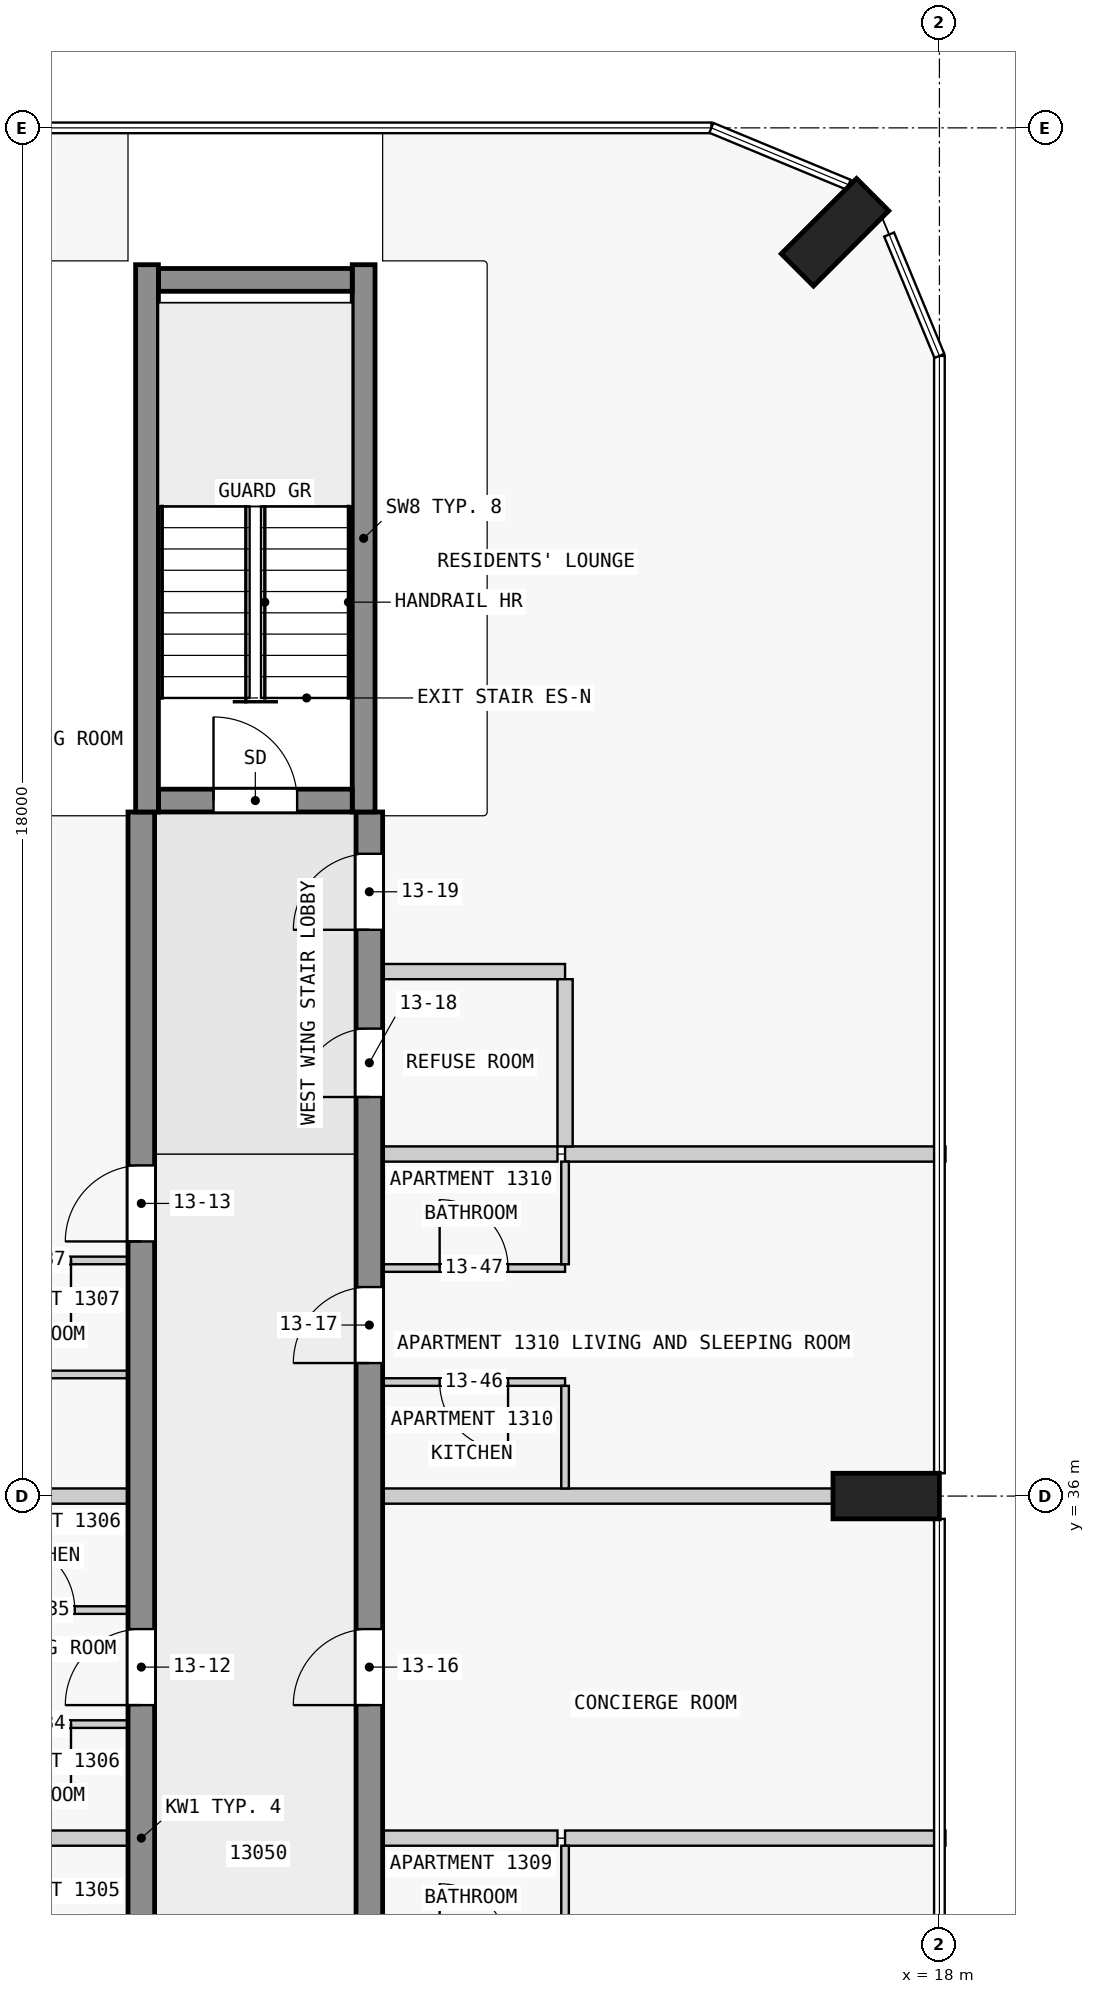
"""IFC4 building model, lengths in metres.
Left out: names, types, materials, properties, quantities, classifications, styles, units other than length and angle.
Written with IfcOpenShell. Run it as: python <this file> out.ifc"""

import sys

from ifc_helpers import new_model, si_unit, direction, frame, frame_2d, origin, origin_2d, place, context, subcontext, project, spatial, rectangle, extrude, element, fill, save


model = new_model("IFC4")
c1 = context("Model", 3, precision=1e-05, world=origin(), true_north=direction((0.0, 1.0)))
c2 = subcontext(c1, "Body", "Model", "MODEL_VIEW")
j1 = project(units=[si_unit("LENGTHUNIT", "METRE"), si_unit("PLANEANGLEUNIT", "RADIAN")], contexts=[c1])
p1 = place(None, origin())
s1 = spatial("IfcSite", under=j1, at=p1, CompositionType="ELEMENT")
p2 = place(p1, origin())
s2 = spatial("IfcBuilding", under=s1, at=p2, CompositionType="ELEMENT")
p3 = place(p2, frame((0.0, 0.0, 54.8)))
s3 = spatial("IfcBuildingStorey", under=s2, at=p3, CompositionType="ELEMENT", Elevation=54.8)
for number, where, z_axis, x_axis in (
    (1, (17.3, 36.0, 0.0), (0.0, 0.0, 1.0), (0.0, 1.0, 0.0)),
    (2, (16.626, 52.626, 0.0), (0.0, 0.0, 1.0), (-0.707, 0.707, 0.0)),
):
    element("IfcColumn", number, at=place(p3, frame(where, z_axis=z_axis, x_axis=x_axis)), inside=s3, PredefinedType="COLUMN", context=c2, shape_type="SweptSolid", body=[
        extrude(rectangle(XDim=0.6, YDim=1.4, at=origin_2d()), origin(), (0.0, 0.0, 1.0), 3.5),
    ])
p4 = place(p3, frame((7.725, 45.15, 0.0), z_axis=(0.0, 0.0, 1.0), x_axis=(1.0, 0.0, 0.0)))
e3 = element("IfcWall", 3, at=p4, inside=s3, PredefinedType="SHEAR", context=c2, shape_type="SweptSolid", body=[
    extrude(rectangle(XDim=2.55, YDim=0.3, at=frame_2d((1.275, 0.0))), origin(), (0.0, 0.0, 1.0), 3.5),
])
p5 = place(p4, frame((0.725, 0.0, 0.0)))
e4 = element("IfcOpeningElement", 4, at=p5, cuts=e3, PredefinedType="OPENING", context=c2, shape_type="SweptSolid", body=[
    extrude(rectangle(XDim=1.1, YDim=2.1, at=frame_2d((0.55, 1.05))), frame((0.0, 0.16, 0.0), z_axis=(0.0, -1.0, 0.0), x_axis=(1.0, 0.0, 0.0)), (0.0, 0.0, 1.0), 0.32),
])
p6 = place(p3, frame((7.725, 52.0, 0.0), z_axis=(0.0, 0.0, 1.0), x_axis=(1.0, 0.0, 0.0)))
e5 = element("IfcWall", 5, at=p6, inside=s3, PredefinedType="SHEAR", context=c2, shape_type="SweptSolid", body=[
    extrude(rectangle(XDim=2.55, YDim=0.3, at=frame_2d((1.275, 0.0))), origin(), (0.0, 0.0, 1.0), 3.5),
])
for number, where, z_axis, x_axis in (
    (6, (7.575, 45.0, 0.0), (0.0, 0.0, 1.0), (0.0, 1.0, 0.0)),
    (7, (10.425, 45.0, 0.0), (0.0, 0.0, 1.0), (0.0, 1.0, 0.0)),
):
    element("IfcWall", number, at=place(p3, frame(where, z_axis=z_axis, x_axis=x_axis)), inside=s3, PredefinedType="SHEAR", context=c2, shape_type="SweptSolid", body=[
        extrude(rectangle(XDim=7.2, YDim=0.3, at=frame_2d((3.6, 0.0))), origin(), (0.0, 0.0, 1.0), 3.5),
    ])
p7 = place(p3, frame((7.5, 18.0, 0.0), z_axis=(0.0, 0.0, 1.0), x_axis=(0.0, 1.0, 0.0)))
e8 = element("IfcWall", 8, at=p7, inside=s3, PredefinedType="SHEAR", context=c2, shape_type="SweptSolid", body=[
    extrude(rectangle(XDim=27.0, YDim=0.35, at=frame_2d((13.5, 0.0))), origin(), (0.0, 0.0, 1.0), 3.25),
])
p8 = place(p7, frame((1.75, 0.0, 0.0)))
e9 = element("IfcOpeningElement", 9, at=p8, cuts=e8, PredefinedType="OPENING", context=c2, shape_type="SweptSolid", body=[
    extrude(rectangle(XDim=1.0, YDim=2.1, at=frame_2d((0.5, 1.05))), frame((0.0, 0.185, 0.0), z_axis=(0.0, -1.0, 0.0), x_axis=(1.0, 0.0, 0.0)), (0.0, 0.0, 1.0), 0.37),
])
p9 = place(p7, frame((8.55, 0.0, 0.0)))
e10 = element("IfcOpeningElement", 10, at=p9, cuts=e8, PredefinedType="OPENING", context=c2, shape_type="SweptSolid", body=[
    extrude(rectangle(XDim=1.0, YDim=2.1, at=frame_2d((0.5, 1.05))), frame((0.0, 0.185, 0.0), z_axis=(0.0, -1.0, 0.0), x_axis=(1.0, 0.0, 0.0)), (0.0, 0.0, 1.0), 0.37),
])
p10 = place(p7, frame((15.25, 0.0, 0.0)))
e11 = element("IfcOpeningElement", 11, at=p10, cuts=e8, PredefinedType="OPENING", context=c2, shape_type="SweptSolid", body=[
    extrude(rectangle(XDim=1.0, YDim=2.1, at=frame_2d((0.5, 1.05))), frame((0.0, 0.185, 0.0), z_axis=(0.0, -1.0, 0.0), x_axis=(1.0, 0.0, 0.0)), (0.0, 0.0, 1.0), 0.37),
])
p11 = place(p7, frame((21.35, 0.0, 0.0)))
e12 = element("IfcOpeningElement", 12, at=p11, cuts=e8, PredefinedType="OPENING", context=c2, shape_type="SweptSolid", body=[
    extrude(rectangle(XDim=1.0, YDim=2.1, at=frame_2d((0.5, 1.05))), frame((0.0, 0.185, 0.0), z_axis=(0.0, -1.0, 0.0), x_axis=(1.0, 0.0, 0.0)), (0.0, 0.0, 1.0), 0.37),
])
p12 = place(p3, frame((10.5, 18.0, 0.0), z_axis=(0.0, 0.0, 1.0), x_axis=(0.0, 1.0, 0.0)))
e13 = element("IfcWall", 13, at=p12, inside=s3, PredefinedType="SHEAR", context=c2, shape_type="SweptSolid", body=[
    extrude(rectangle(XDim=27.0, YDim=0.35, at=frame_2d((13.5, 0.0))), origin(), (0.0, 0.0, 1.0), 3.25),
])
p13 = place(p12, frame((4.05, 0.0, 0.0)))
e14 = element("IfcOpeningElement", 14, at=p13, cuts=e13, PredefinedType="OPENING", context=c2, shape_type="SweptSolid", body=[
    extrude(rectangle(XDim=1.0, YDim=2.1, at=frame_2d((0.5, 1.05))), frame((0.0, 0.185, 0.0), z_axis=(0.0, -1.0, 0.0), x_axis=(1.0, 0.0, 0.0)), (0.0, 0.0, 1.0), 0.37),
])
p14 = place(p12, frame((10.75, 0.0, 0.0)))
e15 = element("IfcOpeningElement", 15, at=p14, cuts=e13, PredefinedType="OPENING", context=c2, shape_type="SweptSolid", body=[
    extrude(rectangle(XDim=1.0, YDim=2.1, at=frame_2d((0.5, 1.05))), frame((0.0, 0.185, 0.0), z_axis=(0.0, -1.0, 0.0), x_axis=(1.0, 0.0, 0.0)), (0.0, 0.0, 1.0), 0.37),
])
p15 = place(p12, frame((15.25, 0.0, 0.0)))
e16 = element("IfcOpeningElement", 16, at=p15, cuts=e13, PredefinedType="OPENING", context=c2, shape_type="SweptSolid", body=[
    extrude(rectangle(XDim=1.0, YDim=2.1, at=frame_2d((0.5, 1.05))), frame((0.0, 0.185, 0.0), z_axis=(0.0, -1.0, 0.0), x_axis=(1.0, 0.0, 0.0)), (0.0, 0.0, 1.0), 0.37),
])
p16 = place(p12, frame((19.75, 0.0, 0.0)))
e17 = element("IfcOpeningElement", 17, at=p16, cuts=e13, PredefinedType="OPENING", context=c2, shape_type="SweptSolid", body=[
    extrude(rectangle(XDim=1.0, YDim=2.1, at=frame_2d((0.5, 1.05))), frame((0.0, 0.185, 0.0), z_axis=(0.0, -1.0, 0.0), x_axis=(1.0, 0.0, 0.0)), (0.0, 0.0, 1.0), 0.37),
])
p17 = place(p12, frame((23.25, 0.0, 0.0)))
e18 = element("IfcOpeningElement", 18, at=p17, cuts=e13, PredefinedType="OPENING", context=c2, shape_type="SweptSolid", body=[
    extrude(rectangle(XDim=0.9, YDim=2.1, at=frame_2d((0.45, 1.05))), frame((0.0, 0.185, 0.0), z_axis=(0.0, -1.0, 0.0), x_axis=(1.0, 0.0, 0.0)), (0.0, 0.0, 1.0), 0.37),
])
p18 = place(p12, frame((25.45, 0.0, 0.0)))
e19 = element("IfcOpeningElement", 19, at=p18, cuts=e13, PredefinedType="OPENING", context=c2, shape_type="SweptSolid", body=[
    extrude(rectangle(XDim=1.0, YDim=2.1, at=frame_2d((0.5, 1.05))), frame((0.0, 0.185, 0.0), z_axis=(0.0, -1.0, 0.0), x_axis=(1.0, 0.0, 0.0)), (0.0, 0.0, 1.0), 0.37),
])
p19 = place(p3, frame((7.325, 31.5, 0.0), z_axis=(0.0, 0.0, 1.0), x_axis=(-1.0, 0.0, 0.0)))
e20 = element("IfcWall", 20, at=p19, inside=s3, PredefinedType="PARTITIONING", context=c2, shape_type="SweptSolid", body=[
    extrude(rectangle(XDim=7.175, YDim=0.2, at=frame_2d((3.587, 0.0))), origin(), (0.0, 0.0, 1.0), 3.25),
])
p20 = place(p3, frame((12.975, 31.5, 0.0), z_axis=(0.0, 0.0, 1.0), x_axis=(-1.0, 0.0, 0.0)))
e21 = element("IfcWall", 21, at=p20, inside=s3, PredefinedType="PARTITIONING", context=c2, shape_type="SweptSolid", body=[
    extrude(rectangle(XDim=2.3, YDim=0.2, at=frame_2d((1.15, 0.0))), origin(), (0.0, 0.0, 1.0), 3.25),
])
p21 = place(p3, frame((13.075, 31.5, 0.0), z_axis=(0.0, 0.0, 1.0), x_axis=(1.0, 0.0, 0.0)))
e22 = element("IfcWall", 22, at=p21, inside=s3, PredefinedType="PARTITIONING", context=c2, shape_type="SweptSolid", body=[
    extrude(rectangle(XDim=5.005, YDim=0.2, at=frame_2d((2.502, 0.0))), origin(), (0.0, 0.0, 1.0), 3.25),
])
p22 = place(p3, frame((7.325, 33.0, 0.0), z_axis=(0.0, 0.0, 1.0), x_axis=(-1.0, 0.0, 0.0)))
e23 = element("IfcWall", 23, at=p22, inside=s3, PredefinedType="PARTITIONING", context=c2, shape_type="SweptSolid", body=[
    extrude(rectangle(XDim=2.35, YDim=0.1, at=frame_2d((1.175, 0.0))), origin(), (0.0, 0.0, 1.0), 3.25),
])
p23 = place(p22, frame((0.75, 0.0, 0.0)))
e24 = element("IfcOpeningElement", 24, at=p23, cuts=e23, PredefinedType="OPENING", context=c2, shape_type="SweptSolid", body=[
    extrude(rectangle(XDim=0.9, YDim=2.1, at=frame_2d((0.45, 1.05))), frame((0.0, 0.06, 0.0), z_axis=(0.0, -1.0, 0.0), x_axis=(1.0, 0.0, 0.0)), (0.0, 0.0, 1.0), 0.12),
])
p24 = place(p3, frame((4.975, 34.5, 0.0), z_axis=(0.0, 0.0, 1.0), x_axis=(1.0, 0.0, 0.0)))
e25 = element("IfcWall", 25, at=p24, inside=s3, PredefinedType="PARTITIONING", context=c2, shape_type="SweptSolid", body=[
    extrude(rectangle(XDim=2.35, YDim=0.1, at=frame_2d((1.175, 0.0))), origin(), (0.0, 0.0, 1.0), 3.25),
])
p25 = place(p24, frame((0.75, 0.0, 0.0)))
e26 = element("IfcOpeningElement", 26, at=p25, cuts=e25, PredefinedType="OPENING", context=c2, shape_type="SweptSolid", body=[
    extrude(rectangle(XDim=0.9, YDim=2.1, at=frame_2d((0.45, 1.05))), frame((0.0, 0.06, 0.0), z_axis=(0.0, -1.0, 0.0), x_axis=(1.0, 0.0, 0.0)), (0.0, 0.0, 1.0), 0.12),
])
p26 = place(p3, frame((7.325, 36.0, 0.0), z_axis=(0.0, 0.0, 1.0), x_axis=(-1.0, 0.0, 0.0)))
e27 = element("IfcWall", 27, at=p26, inside=s3, PredefinedType="PARTITIONING", context=c2, shape_type="SweptSolid", body=[
    extrude(rectangle(XDim=2.3, YDim=0.2, at=frame_2d((1.15, 0.0))), origin(), (0.0, 0.0, 1.0), 3.25),
])
p27 = place(p3, frame((16.6, 36.0, 0.0), z_axis=(0.0, 0.0, 1.0), x_axis=(-1.0, 0.0, 0.0)))
e28 = element("IfcWall", 28, at=p27, inside=s3, PredefinedType="PARTITIONING", context=c2, shape_type="SweptSolid", body=[
    extrude(rectangle(XDim=5.925, YDim=0.2, at=frame_2d((2.962, 0.0))), origin(), (0.0, 0.0, 1.0), 3.25),
])
p28 = place(p3, frame((13.075, 37.5, 0.0), z_axis=(0.0, 0.0, 1.0), x_axis=(-1.0, 0.0, 0.0)))
e29 = element("IfcWall", 29, at=p28, inside=s3, PredefinedType="PARTITIONING", context=c2, shape_type="SweptSolid", body=[
    extrude(rectangle(XDim=2.4, YDim=0.1, at=frame_2d((1.2, 0.0))), origin(), (0.0, 0.0, 1.0), 3.25),
])
p29 = place(p28, frame((0.75, 0.0, 0.0)))
e30 = element("IfcOpeningElement", 30, at=p29, cuts=e29, PredefinedType="OPENING", context=c2, shape_type="SweptSolid", body=[
    extrude(rectangle(XDim=0.9, YDim=2.1, at=frame_2d((0.45, 1.05))), frame((0.0, 0.06, 0.0), z_axis=(0.0, -1.0, 0.0), x_axis=(1.0, 0.0, 0.0)), (0.0, 0.0, 1.0), 0.12),
])
p30 = place(p3, frame((7.325, 37.6, 0.0), z_axis=(0.0, 0.0, 1.0), x_axis=(-1.0, 0.0, 0.0)))
e31 = element("IfcWall", 31, at=p30, inside=s3, PredefinedType="PARTITIONING", context=c2, shape_type="SweptSolid", body=[
    extrude(rectangle(XDim=2.35, YDim=0.1, at=frame_2d((1.175, 0.0))), origin(), (0.0, 0.0, 1.0), 3.25),
])
p31 = place(p3, frame((10.675, 39.0, 0.0), z_axis=(0.0, 0.0, 1.0), x_axis=(1.0, 0.0, 0.0)))
e32 = element("IfcWall", 32, at=p31, inside=s3, PredefinedType="PARTITIONING", context=c2, shape_type="SweptSolid", body=[
    extrude(rectangle(XDim=2.4, YDim=0.1, at=frame_2d((1.2, 0.0))), origin(), (0.0, 0.0, 1.0), 3.25),
])
p32 = place(p31, frame((0.75, 0.0, 0.0)))
e33 = element("IfcOpeningElement", 33, at=p32, cuts=e32, PredefinedType="OPENING", context=c2, shape_type="SweptSolid", body=[
    extrude(rectangle(XDim=0.9, YDim=2.1, at=frame_2d((0.45, 1.05))), frame((0.0, 0.06, 0.0), z_axis=(0.0, -1.0, 0.0), x_axis=(1.0, 0.0, 0.0)), (0.0, 0.0, 1.0), 0.12),
])
p33 = place(p3, frame((7.325, 39.1, 0.0), z_axis=(0.0, 0.0, 1.0), x_axis=(-1.0, 0.0, 0.0)))
e34 = element("IfcWall", 34, at=p33, inside=s3, PredefinedType="PARTITIONING", context=c2, shape_type="SweptSolid", body=[
    extrude(rectangle(XDim=2.35, YDim=0.1, at=frame_2d((1.175, 0.0))), origin(), (0.0, 0.0, 1.0), 3.25),
])
p34 = place(p33, frame((0.75, 0.0, 0.0)))
e35 = element("IfcOpeningElement", 35, at=p34, cuts=e34, PredefinedType="OPENING", context=c2, shape_type="SweptSolid", body=[
    extrude(rectangle(XDim=0.9, YDim=2.1, at=frame_2d((0.45, 1.05))), frame((0.0, 0.06, 0.0), z_axis=(0.0, -1.0, 0.0), x_axis=(1.0, 0.0, 0.0)), (0.0, 0.0, 1.0), 0.12),
])
p35 = place(p3, frame((12.975, 40.5, 0.0), z_axis=(0.0, 0.0, 1.0), x_axis=(-1.0, 0.0, 0.0)))
e36 = element("IfcWall", 36, at=p35, inside=s3, PredefinedType="PARTITIONING", context=c2, shape_type="SweptSolid", body=[
    extrude(rectangle(XDim=2.3, YDim=0.2, at=frame_2d((1.15, 0.0))), origin(), (0.0, 0.0, 1.0), 3.25),
])
p36 = place(p3, frame((13.075, 40.5, 0.0), z_axis=(0.0, 0.0, 1.0), x_axis=(1.0, 0.0, 0.0)))
e37 = element("IfcWall", 37, at=p36, inside=s3, PredefinedType="PARTITIONING", context=c2, shape_type="SweptSolid", body=[
    extrude(rectangle(XDim=5.005, YDim=0.2, at=frame_2d((2.502, 0.0))), origin(), (0.0, 0.0, 1.0), 3.25),
])
p37 = place(p3, frame((13.075, 42.9, 0.0), z_axis=(0.0, 0.0, 1.0), x_axis=(-1.0, 0.0, 0.0)))
e38 = element("IfcWall", 38, at=p37, inside=s3, PredefinedType="PARTITIONING", context=c2, shape_type="SweptSolid", body=[
    extrude(rectangle(XDim=2.4, YDim=0.2, at=frame_2d((1.2, 0.0))), origin(), (0.0, 0.0, 1.0), 3.25),
])
for number, where, z_axis, x_axis in (
    (39, (13.075, 30.05, 0.0), (0.0, 0.0, 1.0), (0.0, 1.0, 0.0)),
    (40, (13.075, 36.1, 0.0), (0.0, 0.0, 1.0), (0.0, 1.0, 0.0)),
    (41, (13.075, 39.05, 0.0), (0.0, 0.0, 1.0), (0.0, 1.0, 0.0)),
):
    element("IfcWall", number, at=place(p3, frame(where, z_axis=z_axis, x_axis=x_axis)), inside=s3, PredefinedType="PARTITIONING", context=c2, shape_type="SweptSolid", body=[
        extrude(rectangle(XDim=1.35, YDim=0.1, at=frame_2d((0.675, 0.0))), origin(), (0.0, 0.0, 1.0), 3.25),
    ])
p38 = place(p3, frame((13.075, 40.6, 0.0), z_axis=(0.0, 0.0, 1.0), x_axis=(0.0, 1.0, 0.0)))
e42 = element("IfcWall", 42, at=p38, inside=s3, PredefinedType="PARTITIONING", context=c2, shape_type="SweptSolid", body=[
    extrude(rectangle(XDim=2.2, YDim=0.2, at=frame_2d((1.1, 0.0))), origin(), (0.0, 0.0, 1.0), 3.25),
])
p39 = place(p5, origin())
e43 = element("IfcDoor", 43, at=p39, inside=s3, OperationType="SINGLE_SWING_LEFT", PredefinedType="DOOR", context=c2, shape_type="SweptSolid", body=[
    extrude(rectangle(XDim=1.1, YDim=2.1, at=frame_2d((0.55, 1.05))), frame((0.0, 0.025, 0.0), z_axis=(0.0, -1.0, 0.0), x_axis=(1.0, 0.0, 0.0)), (0.0, 0.0, 1.0), 0.05),
])
fill(e4, e43)
p40 = place(p10, origin())
e44 = element("IfcDoor", 44, at=p40, inside=s3, OperationType="SINGLE_SWING_RIGHT", PredefinedType="DOOR", context=c2, shape_type="SweptSolid", body=[
    extrude(rectangle(XDim=1.0, YDim=2.1, at=frame_2d((0.5, 1.05))), frame((0.0, 0.025, 0.0), z_axis=(0.0, -1.0, 0.0), x_axis=(1.0, 0.0, 0.0)), (0.0, 0.0, 1.0), 0.05),
])
fill(e11, e44)
p41 = place(p11, origin())
e45 = element("IfcDoor", 45, at=p41, inside=s3, OperationType="SINGLE_SWING_RIGHT", PredefinedType="DOOR", context=c2, shape_type="SweptSolid", body=[
    extrude(rectangle(XDim=1.0, YDim=2.1, at=frame_2d((0.5, 1.05))), frame((0.0, 0.025, 0.0), z_axis=(0.0, -1.0, 0.0), x_axis=(1.0, 0.0, 0.0)), (0.0, 0.0, 1.0), 0.05),
])
fill(e12, e45)
p42 = place(p15, origin())
e46 = element("IfcDoor", 46, at=p42, inside=s3, OperationType="SINGLE_SWING_RIGHT", PredefinedType="DOOR", context=c2, shape_type="SweptSolid", body=[
    extrude(rectangle(XDim=1.0, YDim=2.1, at=frame_2d((0.5, 1.05))), frame((0.0, 0.025, 0.0), z_axis=(0.0, -1.0, 0.0), x_axis=(1.0, 0.0, 0.0)), (0.0, 0.0, 1.0), 0.05),
])
fill(e16, e46)
p43 = place(p16, origin())
e47 = element("IfcDoor", 47, at=p43, inside=s3, OperationType="SINGLE_SWING_RIGHT", PredefinedType="DOOR", context=c2, shape_type="SweptSolid", body=[
    extrude(rectangle(XDim=1.0, YDim=2.1, at=frame_2d((0.5, 1.05))), frame((0.0, 0.025, 0.0), z_axis=(0.0, -1.0, 0.0), x_axis=(1.0, 0.0, 0.0)), (0.0, 0.0, 1.0), 0.05),
])
fill(e17, e47)
p44 = place(p17, origin())
e48 = element("IfcDoor", 48, at=p44, inside=s3, OperationType="SINGLE_SWING_RIGHT", PredefinedType="DOOR", context=c2, shape_type="SweptSolid", body=[
    extrude(rectangle(XDim=0.9, YDim=2.1, at=frame_2d((0.45, 1.05))), frame((0.0, 0.025, 0.0), z_axis=(0.0, -1.0, 0.0), x_axis=(1.0, 0.0, 0.0)), (0.0, 0.0, 1.0), 0.05),
])
fill(e18, e48)
p45 = place(p18, origin())
e49 = element("IfcDoor", 49, at=p45, inside=s3, OperationType="SINGLE_SWING_RIGHT", PredefinedType="DOOR", context=c2, shape_type="SweptSolid", body=[
    extrude(rectangle(XDim=1.0, YDim=2.1, at=frame_2d((0.5, 1.05))), frame((0.0, 0.025, 0.0), z_axis=(0.0, -1.0, 0.0), x_axis=(1.0, 0.0, 0.0)), (0.0, 0.0, 1.0), 0.05),
])
fill(e19, e49)
p46 = place(p23, origin())
e50 = element("IfcDoor", 50, at=p46, inside=s3, OperationType="SINGLE_SWING_RIGHT", PredefinedType="DOOR", context=c2, shape_type="SweptSolid", body=[
    extrude(rectangle(XDim=0.9, YDim=2.1, at=frame_2d((0.45, 1.05))), frame((0.0, 0.025, 0.0), z_axis=(0.0, -1.0, 0.0), x_axis=(1.0, 0.0, 0.0)), (0.0, 0.0, 1.0), 0.05),
])
fill(e24, e50)
p47 = place(p25, origin())
e51 = element("IfcDoor", 51, at=p47, inside=s3, OperationType="SINGLE_SWING_RIGHT", PredefinedType="DOOR", context=c2, shape_type="SweptSolid", body=[
    extrude(rectangle(XDim=0.9, YDim=2.1, at=frame_2d((0.45, 1.05))), frame((0.0, 0.025, 0.0), z_axis=(0.0, -1.0, 0.0), x_axis=(1.0, 0.0, 0.0)), (0.0, 0.0, 1.0), 0.05),
])
fill(e26, e51)
p48 = place(p34, origin())
e52 = element("IfcDoor", 52, at=p48, inside=s3, OperationType="SINGLE_SWING_RIGHT", PredefinedType="DOOR", context=c2, shape_type="SweptSolid", body=[
    extrude(rectangle(XDim=0.9, YDim=2.1, at=frame_2d((0.45, 1.05))), frame((0.0, 0.025, 0.0), z_axis=(0.0, -1.0, 0.0), x_axis=(1.0, 0.0, 0.0)), (0.0, 0.0, 1.0), 0.05),
])
fill(e35, e52)
p49 = place(p29, origin())
e53 = element("IfcDoor", 53, at=p49, inside=s3, OperationType="SINGLE_SWING_RIGHT", PredefinedType="DOOR", context=c2, shape_type="SweptSolid", body=[
    extrude(rectangle(XDim=0.9, YDim=2.1, at=frame_2d((0.45, 1.05))), frame((0.0, 0.025, 0.0), z_axis=(0.0, -1.0, 0.0), x_axis=(1.0, 0.0, 0.0)), (0.0, 0.0, 1.0), 0.05),
])
fill(e30, e53)
p50 = place(p32, origin())
e54 = element("IfcDoor", 54, at=p50, inside=s3, OperationType="SINGLE_SWING_RIGHT", PredefinedType="DOOR", context=c2, shape_type="SweptSolid", body=[
    extrude(rectangle(XDim=0.9, YDim=2.1, at=frame_2d((0.45, 1.05))), frame((0.0, 0.025, 0.0), z_axis=(0.0, -1.0, 0.0), x_axis=(1.0, 0.0, 0.0)), (0.0, 0.0, 1.0), 0.05),
])
fill(e33, e54)
save(model, sys.argv[1])
